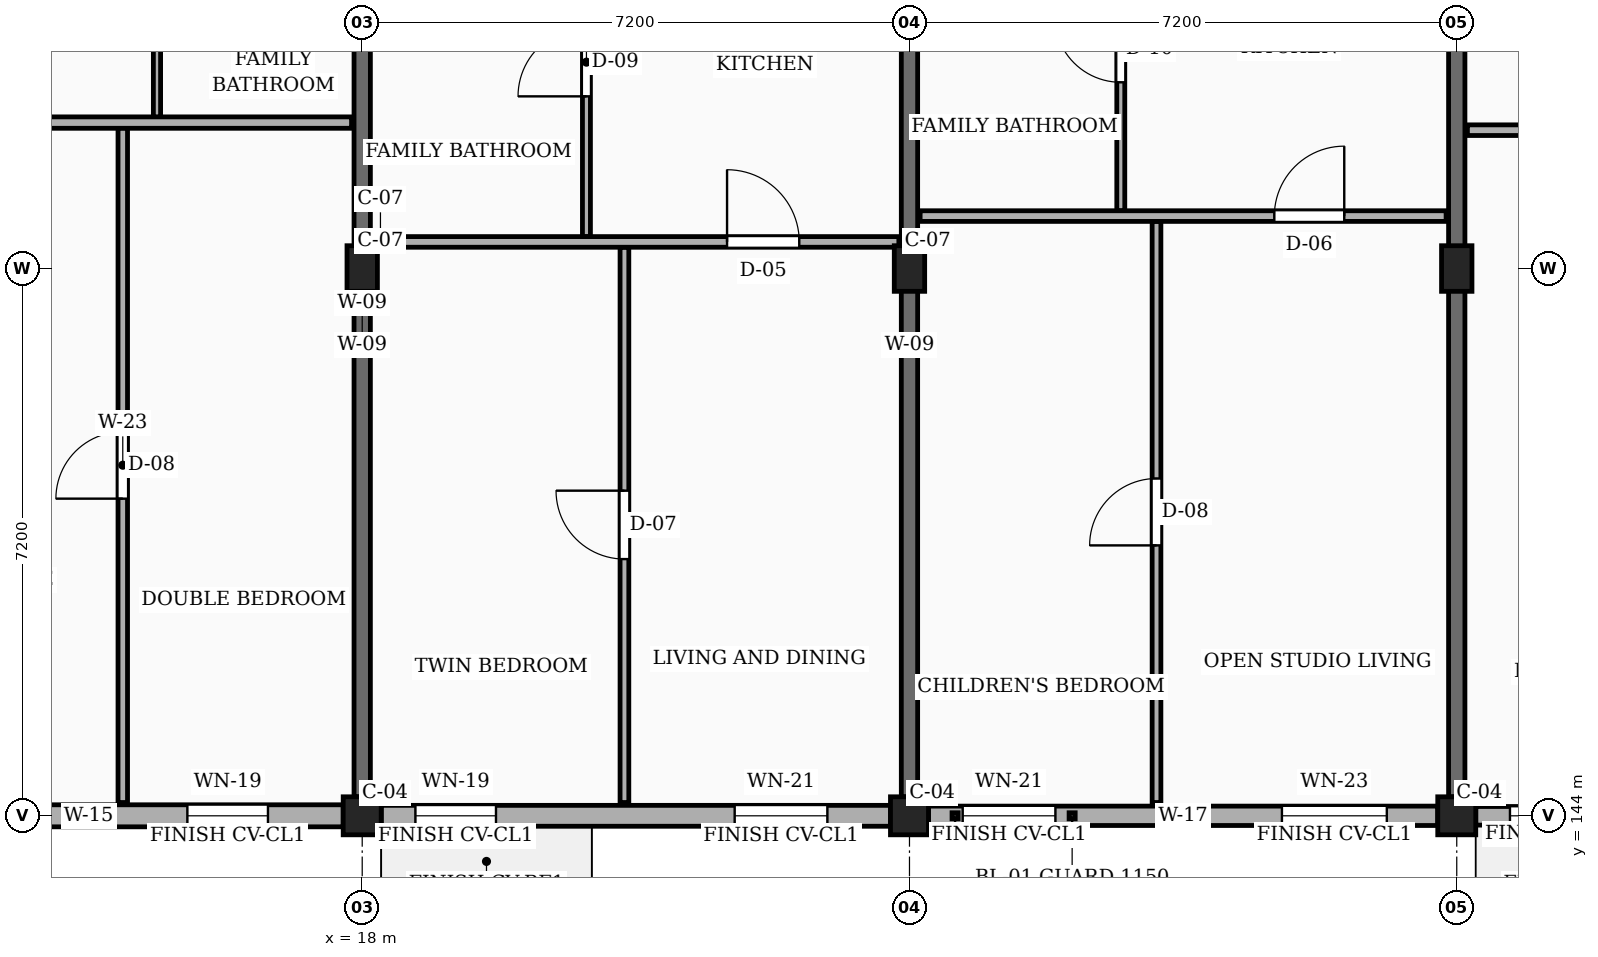
"""IFC4 building model, lengths in metres.
Left out: names, types, materials, properties, quantities, classifications, styles, units other than length and angle.
Written with IfcOpenShell. Run it as: python <this file> out.ifc"""

import sys

from ifc_helpers import new_model, si_unit, direction, frame, frame_2d, origin, origin_2d, place, context, subcontext, project, spatial, rectangle, extrude, element, fill, save


model = new_model("IFC4")
c1 = context("Model", 3, precision=1e-05, world=origin(), true_north=direction((0.0, 1.0)))
c2 = subcontext(c1, "Body", "Model", "MODEL_VIEW")
j1 = project(units=[si_unit("LENGTHUNIT", "METRE"), si_unit("PLANEANGLEUNIT", "RADIAN")], contexts=[c1])
p1 = place(None, origin())
s1 = spatial("IfcSite", under=j1, at=p1, CompositionType="ELEMENT")
p2 = place(p1, origin())
s2 = spatial("IfcBuilding", under=s1, at=p2, CompositionType="ELEMENT")
p3 = place(p2, frame((0.0, 0.0, 32.85)))
s3 = spatial("IfcBuildingStorey", under=s2, at=p3, CompositionType="ELEMENT", Elevation=32.85)
p4 = place(p3, frame((18.0, 144.0, 0.0), z_axis=(0.0, 0.0, 1.0), x_axis=(1.0, 0.0, 0.0)))
e1 = element("IfcColumn", 1, at=p4, inside=s3, PredefinedType="COLUMN", context=c2, shape_type="SweptSolid", body=[
    extrude(rectangle(XDim=0.5, YDim=0.5, at=origin_2d()), origin(), (0.0, 0.0, 1.0), 3.15),
])
p5 = place(p3, frame((18.0, 151.2, 0.0), z_axis=(0.0, 0.0, 1.0), x_axis=(1.0, 0.0, 0.0)))
e2 = element("IfcColumn", 2, at=p5, inside=s3, PredefinedType="COLUMN", context=c2, shape_type="SweptSolid", body=[
    extrude(rectangle(XDim=0.4, YDim=0.6, at=origin_2d()), origin(), (0.0, 0.0, 1.0), 3.15),
])
p6 = place(p3, frame((25.2, 144.0, 0.0), z_axis=(0.0, 0.0, 1.0), x_axis=(1.0, 0.0, 0.0)))
e3 = element("IfcColumn", 3, at=p6, inside=s3, PredefinedType="COLUMN", context=c2, shape_type="SweptSolid", body=[
    extrude(rectangle(XDim=0.5, YDim=0.5, at=origin_2d()), origin(), (0.0, 0.0, 1.0), 3.15),
])
p7 = place(p3, frame((25.2, 151.2, 0.0), z_axis=(0.0, 0.0, 1.0), x_axis=(1.0, 0.0, 0.0)))
e4 = element("IfcColumn", 4, at=p7, inside=s3, PredefinedType="COLUMN", context=c2, shape_type="SweptSolid", body=[
    extrude(rectangle(XDim=0.4, YDim=0.6, at=origin_2d()), origin(), (0.0, 0.0, 1.0), 3.15),
])
p8 = place(p3, frame((32.4, 144.0, 0.0), z_axis=(0.0, 0.0, 1.0), x_axis=(1.0, 0.0, 0.0)))
e5 = element("IfcColumn", 5, at=p8, inside=s3, PredefinedType="COLUMN", context=c2, shape_type="SweptSolid", body=[
    extrude(rectangle(XDim=0.5, YDim=0.5, at=origin_2d()), origin(), (0.0, 0.0, 1.0), 3.15),
])
p9 = place(p3, frame((32.4, 151.2, 0.0), z_axis=(0.0, 0.0, 1.0), x_axis=(1.0, 0.0, 0.0)))
e6 = element("IfcColumn", 6, at=p9, inside=s3, PredefinedType="COLUMN", context=c2, shape_type="SweptSolid", body=[
    extrude(rectangle(XDim=0.4, YDim=0.6, at=origin_2d()), origin(), (0.0, 0.0, 1.0), 3.15),
])
for number, where, z_axis, x_axis in (
    (7, (18.0, 144.25, 0.0), (0.0, 0.0, 1.0), (0.0, 1.0, 0.0)),
    (8, (25.2, 144.25, 0.0), (0.0, 0.0, 1.0), (0.0, 1.0, 0.0)),
    (9, (32.4, 144.25, 0.0), (0.0, 0.0, 1.0), (0.0, 1.0, 0.0)),
):
    element("IfcWall", number, at=place(p3, frame(where, z_axis=z_axis, x_axis=x_axis)), inside=s3, PredefinedType="SOLIDWALL", context=c2, shape_type="SweptSolid", body=[
        extrude(rectangle(XDim=11.9, YDim=0.215, at=frame_2d((5.95, 0.0))), origin(), (0.0, 0.0, 1.0), 2.185),
    ])
p10 = place(p3, frame((11.05, 144.0, 0.0), z_axis=(0.0, 0.0, 1.0), x_axis=(1.0, 0.0, 0.0)))
e10 = element("IfcWall", 10, at=p10, inside=s3, PredefinedType="SOLIDWALL", context=c2, shape_type="SweptSolid", body=[
    extrude(rectangle(XDim=6.7, YDim=0.29, at=frame_2d((3.35, 0.0))), origin(), (0.0, 0.0, 1.0), 2.455),
])
p11 = place(p10, frame((0.45, 0.0, 0.78)))
e11 = element("IfcOpeningElement", 11, at=p11, cuts=e10, PredefinedType="OPENING", context=c2, shape_type="SweptSolid", body=[
    extrude(rectangle(XDim=0.9, YDim=1.36, at=frame_2d((0.45, 0.68))), frame((0.0, 0.155, 0.0), z_axis=(0.0, -1.0, 0.0), x_axis=(1.0, 0.0, 0.0)), (0.0, 0.0, 1.0), 0.31),
])
p12 = place(p10, frame((4.65, 0.0, 0.78)))
e12 = element("IfcOpeningElement", 12, at=p12, cuts=e10, PredefinedType="OPENING", context=c2, shape_type="SweptSolid", body=[
    extrude(rectangle(XDim=1.06, YDim=1.36, at=frame_2d((0.53, 0.68))), frame((0.0, 0.155, 0.0), z_axis=(0.0, -1.0, 0.0), x_axis=(1.0, 0.0, 0.0)), (0.0, 0.0, 1.0), 0.31),
])
p13 = place(p3, frame((18.25, 144.0, 0.0), z_axis=(0.0, 0.0, 1.0), x_axis=(1.0, 0.0, 0.0)))
e13 = element("IfcWall", 13, at=p13, inside=s3, PredefinedType="SOLIDWALL", context=c2, shape_type="SweptSolid", body=[
    extrude(rectangle(XDim=6.7, YDim=0.275, at=frame_2d((3.35, 0.0))), origin(), (0.0, 0.0, 1.0), 2.455),
])
p14 = place(p13, frame((0.45, 0.0, 0.78)))
e14 = element("IfcOpeningElement", 14, at=p14, cuts=e13, PredefinedType="OPENING", context=c2, shape_type="SweptSolid", body=[
    extrude(rectangle(XDim=1.06, YDim=1.36, at=frame_2d((0.53, 0.68))), frame((0.0, 0.147, 0.0), z_axis=(0.0, -1.0, 0.0), x_axis=(1.0, 0.0, 0.0)), (0.0, 0.0, 1.0), 0.295),
])
p15 = place(p13, frame((4.65, 0.0, 0.78)))
e15 = element("IfcOpeningElement", 15, at=p15, cuts=e13, PredefinedType="OPENING", context=c2, shape_type="SweptSolid", body=[
    extrude(rectangle(XDim=1.22, YDim=1.36, at=frame_2d((0.61, 0.68))), frame((0.0, 0.147, 0.0), z_axis=(0.0, -1.0, 0.0), x_axis=(1.0, 0.0, 0.0)), (0.0, 0.0, 1.0), 0.295),
])
p16 = place(p3, frame((25.45, 144.0, 0.0), z_axis=(0.0, 0.0, 1.0), x_axis=(1.0, 0.0, 0.0)))
e16 = element("IfcWall", 16, at=p16, inside=s3, PredefinedType="SOLIDWALL", context=c2, shape_type="SweptSolid", body=[
    extrude(rectangle(XDim=6.7, YDim=0.255, at=frame_2d((3.35, 0.0))), origin(), (0.0, 0.0, 1.0), 2.455),
])
p17 = place(p16, frame((0.45, 0.0, 0.78)))
e17 = element("IfcOpeningElement", 17, at=p17, cuts=e16, PredefinedType="OPENING", context=c2, shape_type="SweptSolid", body=[
    extrude(rectangle(XDim=1.22, YDim=1.36, at=frame_2d((0.61, 0.68))), frame((0.0, 0.137, 0.0), z_axis=(0.0, -1.0, 0.0), x_axis=(1.0, 0.0, 0.0)), (0.0, 0.0, 1.0), 0.275),
])
p18 = place(p16, frame((4.65, 0.0, 0.78)))
e18 = element("IfcOpeningElement", 18, at=p18, cuts=e16, PredefinedType="OPENING", context=c2, shape_type="SweptSolid", body=[
    extrude(rectangle(XDim=1.38, YDim=1.36, at=frame_2d((0.69, 0.68))), frame((0.0, 0.137, 0.0), z_axis=(0.0, -1.0, 0.0), x_axis=(1.0, 0.0, 0.0)), (0.0, 0.0, 1.0), 0.275),
])
p19 = place(p3, frame((32.65, 144.0, 0.0), z_axis=(0.0, 0.0, 1.0), x_axis=(1.0, 0.0, 0.0)))
e19 = element("IfcWall", 19, at=p19, inside=s3, PredefinedType="SOLIDWALL", context=c2, shape_type="SweptSolid", body=[
    extrude(rectangle(XDim=6.7, YDim=0.245, at=frame_2d((3.35, 0.0))), origin(), (0.0, 0.0, 1.0), 2.455),
])
p20 = place(p19, frame((0.45, 0.0, 0.78)))
e20 = element("IfcOpeningElement", 20, at=p20, cuts=e19, PredefinedType="OPENING", context=c2, shape_type="SweptSolid", body=[
    extrude(rectangle(XDim=1.38, YDim=1.36, at=frame_2d((0.69, 0.68))), frame((0.0, 0.133, 0.0), z_axis=(0.0, -1.0, 0.0), x_axis=(1.0, 0.0, 0.0)), (0.0, 0.0, 1.0), 0.265),
])
p21 = place(p19, frame((4.65, 0.0, 0.78)))
e21 = element("IfcOpeningElement", 21, at=p21, cuts=e19, PredefinedType="OPENING", context=c2, shape_type="SweptSolid", body=[
    extrude(rectangle(XDim=0.94, YDim=1.44, at=frame_2d((0.47, 0.72))), frame((0.0, 0.133, 0.0), z_axis=(0.0, -1.0, 0.0), x_axis=(1.0, 0.0, 0.0)), (0.0, 0.0, 1.0), 0.265),
])
p22 = place(p3, frame((14.85, 144.175, 0.0), z_axis=(0.0, 0.0, 1.0), x_axis=(0.0, 1.0, 0.0)))
e22 = element("IfcWall", 22, at=p22, inside=s3, PredefinedType="PARTITIONING", context=c2, shape_type="SweptSolid", body=[
    extrude(rectangle(XDim=8.875, YDim=0.125, at=frame_2d((4.438, 0.0))), origin(), (0.0, 0.0, 1.0), 2.32),
])
p23 = place(p22, frame((3.998, 0.0, 0.0)))
e23 = element("IfcOpeningElement", 23, at=p23, cuts=e22, PredefinedType="OPENING", context=c2, shape_type="SweptSolid", body=[
    extrude(rectangle(XDim=0.88, YDim=2.08, at=frame_2d((0.44, 1.04))), frame((0.0, 0.073, 0.0), z_axis=(0.0, -1.0, 0.0), x_axis=(1.0, 0.0, 0.0)), (0.0, 0.0, 1.0), 0.145),
])
p24 = place(p3, frame((15.3, 153.19, 0.0), z_axis=(0.0, 0.0, 1.0), x_axis=(0.0, 1.0, 0.0)))
e24 = element("IfcWall", 24, at=p24, inside=s3, PredefinedType="PARTITIONING", context=c2, shape_type="SweptSolid", body=[
    extrude(rectangle(XDim=3.02, YDim=0.095, at=frame_2d((1.51, 0.0))), origin(), (0.0, 0.0, 1.0), 2.32),
])
p25 = place(p24, frame((1.075, 0.0, 0.0)))
e25 = element("IfcOpeningElement", 25, at=p25, cuts=e24, PredefinedType="OPENING", context=c2, shape_type="SweptSolid", body=[
    extrude(rectangle(XDim=0.87, YDim=2.05, at=frame_2d((0.435, 1.025))), frame((0.0, 0.058, 0.0), z_axis=(0.0, -1.0, 0.0), x_axis=(1.0, 0.0, 0.0)), (0.0, 0.0, 1.0), 0.115),
])
p26 = place(p3, frame((10.975, 153.12, 0.0), z_axis=(0.0, 0.0, 1.0), x_axis=(1.0, 0.0, 0.0)))
e26 = element("IfcWall", 26, at=p26, inside=s3, PredefinedType="PARTITIONING", context=c2, shape_type="SweptSolid", body=[
    extrude(rectangle(XDim=6.885, YDim=0.15, at=frame_2d((3.442, 0.0))), origin(), (0.0, 0.0, 1.0), 2.32),
])
p27 = place(p26, frame((1.275, 0.0, 0.0)))
e27 = element("IfcOpeningElement", 27, at=p27, cuts=e26, PredefinedType="OPENING", context=c2, shape_type="SweptSolid", body=[
    extrude(rectangle(XDim=0.92, YDim=2.1, at=frame_2d((0.46, 1.05))), frame((0.0, 0.085, 0.0), z_axis=(0.0, -1.0, 0.0), x_axis=(1.0, 0.0, 0.0)), (0.0, 0.0, 1.0), 0.17),
])
p28 = place(p3, frame((21.45, 144.175, 0.0), z_axis=(0.0, 0.0, 1.0), x_axis=(0.0, 1.0, 0.0)))
e28 = element("IfcWall", 28, at=p28, inside=s3, PredefinedType="PARTITIONING", context=c2, shape_type="SweptSolid", body=[
    extrude(rectangle(XDim=7.305, YDim=0.115, at=frame_2d((3.652, 0.0))), origin(), (0.0, 0.0, 1.0), 2.32),
])
p29 = place(p28, frame((3.202, 0.0, 0.0)))
e29 = element("IfcOpeningElement", 29, at=p29, cuts=e28, PredefinedType="OPENING", context=c2, shape_type="SweptSolid", body=[
    extrude(rectangle(XDim=0.9, YDim=2.1, at=frame_2d((0.45, 1.05))), frame((0.0, 0.067, 0.0), z_axis=(0.0, -1.0, 0.0), x_axis=(1.0, 0.0, 0.0)), (0.0, 0.0, 1.0), 0.135),
])
p30 = place(p3, frame((20.95, 151.62, 0.0), z_axis=(0.0, 0.0, 1.0), x_axis=(0.0, 1.0, 0.0)))
e30 = element("IfcWall", 30, at=p30, inside=s3, PredefinedType="PARTITIONING", context=c2, shape_type="SweptSolid", body=[
    extrude(rectangle(XDim=4.59, YDim=0.105, at=frame_2d((2.295, 0.0))), origin(), (0.0, 0.0, 1.0), 2.32),
])
p31 = place(p30, frame((1.845, 0.0, 0.0)))
e31 = element("IfcOpeningElement", 31, at=p31, cuts=e30, PredefinedType="OPENING", context=c2, shape_type="SweptSolid", body=[
    extrude(rectangle(XDim=0.9, YDim=2.05, at=frame_2d((0.45, 1.025))), frame((0.0, 0.062, 0.0), z_axis=(0.0, -1.0, 0.0), x_axis=(1.0, 0.0, 0.0)), (0.0, 0.0, 1.0), 0.125),
])
p32 = place(p3, frame((18.14, 151.55, 0.0), z_axis=(0.0, 0.0, 1.0), x_axis=(1.0, 0.0, 0.0)))
e32 = element("IfcWall", 32, at=p32, inside=s3, PredefinedType="PARTITIONING", context=c2, shape_type="SweptSolid", body=[
    extrude(rectangle(XDim=6.92, YDim=0.14, at=frame_2d((3.46, 0.0))), origin(), (0.0, 0.0, 1.0), 2.32),
])
p33 = place(p32, frame((4.66, 0.0, 0.0)))
e33 = element("IfcOpeningElement", 33, at=p33, cuts=e32, PredefinedType="OPENING", context=c2, shape_type="SweptSolid", body=[
    extrude(rectangle(XDim=0.95, YDim=2.1, at=frame_2d((0.475, 1.05))), frame((0.0, 0.08, 0.0), z_axis=(0.0, -1.0, 0.0), x_axis=(1.0, 0.0, 0.0)), (0.0, 0.0, 1.0), 0.16),
])
p34 = place(p3, frame((28.45, 144.175, 0.0), z_axis=(0.0, 0.0, 1.0), x_axis=(0.0, 1.0, 0.0)))
e34 = element("IfcWall", 34, at=p34, inside=s3, PredefinedType="PARTITIONING", context=c2, shape_type="SweptSolid", body=[
    extrude(rectangle(XDim=7.645, YDim=0.115, at=frame_2d((3.823, 0.0))), origin(), (0.0, 0.0, 1.0), 2.32),
])
p35 = place(p34, frame((3.383, 0.0, 0.0)))
e35 = element("IfcOpeningElement", 35, at=p35, cuts=e34, PredefinedType="OPENING", context=c2, shape_type="SweptSolid", body=[
    extrude(rectangle(XDim=0.88, YDim=2.08, at=frame_2d((0.44, 1.04))), frame((0.0, 0.067, 0.0), z_axis=(0.0, -1.0, 0.0), x_axis=(1.0, 0.0, 0.0)), (0.0, 0.0, 1.0), 0.135),
])
p36 = place(p3, frame((27.98, 151.96, 0.0), z_axis=(0.0, 0.0, 1.0), x_axis=(0.0, 1.0, 0.0)))
e36 = element("IfcWall", 36, at=p36, inside=s3, PredefinedType="PARTITIONING", context=c2, shape_type="SweptSolid", body=[
    extrude(rectangle(XDim=4.25, YDim=0.105, at=frame_2d((2.125, 0.0))), origin(), (0.0, 0.0, 1.0), 2.32),
])
p37 = place(p36, frame((1.69, 0.0, 0.0)))
e37 = element("IfcOpeningElement", 37, at=p37, cuts=e36, PredefinedType="OPENING", context=c2, shape_type="SweptSolid", body=[
    extrude(rectangle(XDim=0.87, YDim=2.05, at=frame_2d((0.435, 1.025))), frame((0.0, 0.062, 0.0), z_axis=(0.0, -1.0, 0.0), x_axis=(1.0, 0.0, 0.0)), (0.0, 0.0, 1.0), 0.125),
])
p38 = place(p3, frame((25.34, 151.89, 0.0), z_axis=(0.0, 0.0, 1.0), x_axis=(1.0, 0.0, 0.0)))
e38 = element("IfcWall", 38, at=p38, inside=s3, PredefinedType="PARTITIONING", context=c2, shape_type="SweptSolid", body=[
    extrude(rectangle(XDim=6.92, YDim=0.14, at=frame_2d((3.46, 0.0))), origin(), (0.0, 0.0, 1.0), 2.32),
])
p39 = place(p38, frame((4.66, 0.0, 0.0)))
e39 = element("IfcOpeningElement", 39, at=p39, cuts=e38, PredefinedType="OPENING", context=c2, shape_type="SweptSolid", body=[
    extrude(rectangle(XDim=0.92, YDim=2.1, at=frame_2d((0.46, 1.05))), frame((0.0, 0.08, 0.0), z_axis=(0.0, -1.0, 0.0), x_axis=(1.0, 0.0, 0.0)), (0.0, 0.0, 1.0), 0.16),
])
p40 = place(p3, frame((32.54, 153.02, 0.0), z_axis=(0.0, 0.0, 1.0), x_axis=(1.0, 0.0, 0.0)))
e40 = element("IfcWall", 40, at=p40, inside=s3, PredefinedType="PARTITIONING", context=c2, shape_type="SweptSolid", body=[
    extrude(rectangle(XDim=6.92, YDim=0.14, at=frame_2d((3.46, 0.0))), origin(), (0.0, 0.0, 1.0), 2.32),
])
p41 = place(p40, frame((1.31, 0.0, 0.0)))
e41 = element("IfcOpeningElement", 41, at=p41, cuts=e40, PredefinedType="OPENING", context=c2, shape_type="SweptSolid", body=[
    extrude(rectangle(XDim=0.95, YDim=2.1, at=frame_2d((0.475, 1.05))), frame((0.0, 0.08, 0.0), z_axis=(0.0, -1.0, 0.0), x_axis=(1.0, 0.0, 0.0)), (0.0, 0.0, 1.0), 0.16),
])
p42 = place(p12, origin())
e42 = element("IfcWindow", 42, at=p42, inside=s3, PartitioningType="SINGLE_PANEL", PredefinedType="WINDOW", context=c2, shape_type="SweptSolid", body=[
    extrude(rectangle(XDim=1.06, YDim=1.36, at=frame_2d((0.53, 0.68))), frame((0.0, 0.03, 0.0), z_axis=(0.0, -1.0, 0.0), x_axis=(1.0, 0.0, 0.0)), (0.0, 0.0, 1.0), 0.06),
])
fill(e12, e42)
p43 = place(p14, origin())
e43 = element("IfcWindow", 43, at=p43, inside=s3, PartitioningType="SINGLE_PANEL", PredefinedType="WINDOW", context=c2, shape_type="SweptSolid", body=[
    extrude(rectangle(XDim=1.06, YDim=1.36, at=frame_2d((0.53, 0.68))), frame((0.0, 0.03, 0.0), z_axis=(0.0, -1.0, 0.0), x_axis=(1.0, 0.0, 0.0)), (0.0, 0.0, 1.0), 0.06),
])
fill(e14, e43)
p44 = place(p15, origin())
e44 = element("IfcWindow", 44, at=p44, inside=s3, PartitioningType="SINGLE_PANEL", PredefinedType="WINDOW", context=c2, shape_type="SweptSolid", body=[
    extrude(rectangle(XDim=1.22, YDim=1.36, at=frame_2d((0.61, 0.68))), frame((0.0, 0.03, 0.0), z_axis=(0.0, -1.0, 0.0), x_axis=(1.0, 0.0, 0.0)), (0.0, 0.0, 1.0), 0.06),
])
fill(e15, e44)
p45 = place(p17, origin())
e45 = element("IfcWindow", 45, at=p45, inside=s3, PartitioningType="SINGLE_PANEL", PredefinedType="WINDOW", context=c2, shape_type="SweptSolid", body=[
    extrude(rectangle(XDim=1.22, YDim=1.36, at=frame_2d((0.61, 0.68))), frame((0.0, 0.03, 0.0), z_axis=(0.0, -1.0, 0.0), x_axis=(1.0, 0.0, 0.0)), (0.0, 0.0, 1.0), 0.06),
])
fill(e17, e45)
p46 = place(p18, origin())
e46 = element("IfcWindow", 46, at=p46, inside=s3, PartitioningType="SINGLE_PANEL", PredefinedType="WINDOW", context=c2, shape_type="SweptSolid", body=[
    extrude(rectangle(XDim=1.38, YDim=1.36, at=frame_2d((0.69, 0.68))), frame((0.0, 0.03, 0.0), z_axis=(0.0, -1.0, 0.0), x_axis=(1.0, 0.0, 0.0)), (0.0, 0.0, 1.0), 0.06),
])
fill(e18, e46)
p47 = place(p20, origin())
e47 = element("IfcWindow", 47, at=p47, inside=s3, PartitioningType="SINGLE_PANEL", PredefinedType="WINDOW", context=c2, shape_type="SweptSolid", body=[
    extrude(rectangle(XDim=1.38, YDim=1.36, at=frame_2d((0.69, 0.68))), frame((0.0, 0.03, 0.0), z_axis=(0.0, -1.0, 0.0), x_axis=(1.0, 0.0, 0.0)), (0.0, 0.0, 1.0), 0.06),
])
fill(e20, e47)
p48 = place(p23, origin())
e48 = element("IfcDoor", 48, at=p48, inside=s3, OperationType="SINGLE_SWING_LEFT", PredefinedType="DOOR", context=c2, shape_type="SweptSolid", body=[
    extrude(rectangle(XDim=0.88, YDim=2.08, at=frame_2d((0.44, 1.04))), frame((0.0, 0.025, 0.0), z_axis=(0.0, -1.0, 0.0), x_axis=(1.0, 0.0, 0.0)), (0.0, 0.0, 1.0), 0.05),
])
fill(e23, e48)
p49 = place(p29, origin())
e49 = element("IfcDoor", 49, at=p49, inside=s3, OperationType="SINGLE_SWING_RIGHT", PredefinedType="DOOR", context=c2, shape_type="SweptSolid", body=[
    extrude(rectangle(XDim=0.9, YDim=2.1, at=frame_2d((0.45, 1.05))), frame((0.0, 0.025, 0.0), z_axis=(0.0, -1.0, 0.0), x_axis=(1.0, 0.0, 0.0)), (0.0, 0.0, 1.0), 0.05),
])
fill(e29, e49)
p50 = place(p31, origin())
e50 = element("IfcDoor", 50, at=p50, inside=s3, OperationType="SINGLE_SWING_LEFT", PredefinedType="DOOR", context=c2, shape_type="SweptSolid", body=[
    extrude(rectangle(XDim=0.9, YDim=2.05, at=frame_2d((0.45, 1.025))), frame((0.0, 0.025, 0.0), z_axis=(0.0, -1.0, 0.0), x_axis=(1.0, 0.0, 0.0)), (0.0, 0.0, 1.0), 0.05),
])
fill(e31, e50)
p51 = place(p33, origin())
e51 = element("IfcDoor", 51, at=p51, inside=s3, OperationType="SINGLE_SWING_LEFT", PredefinedType="DOOR", context=c2, shape_type="SweptSolid", body=[
    extrude(rectangle(XDim=0.95, YDim=2.1, at=frame_2d((0.475, 1.05))), frame((0.0, 0.025, 0.0), z_axis=(0.0, -1.0, 0.0), x_axis=(1.0, 0.0, 0.0)), (0.0, 0.0, 1.0), 0.05),
])
fill(e33, e51)
p52 = place(p35, origin())
e52 = element("IfcDoor", 52, at=p52, inside=s3, OperationType="SINGLE_SWING_LEFT", PredefinedType="DOOR", context=c2, shape_type="SweptSolid", body=[
    extrude(rectangle(XDim=0.88, YDim=2.08, at=frame_2d((0.44, 1.04))), frame((0.0, 0.025, 0.0), z_axis=(0.0, -1.0, 0.0), x_axis=(1.0, 0.0, 0.0)), (0.0, 0.0, 1.0), 0.05),
])
fill(e35, e52)
p53 = place(p37, origin())
e53 = element("IfcDoor", 53, at=p53, inside=s3, OperationType="SINGLE_SWING_RIGHT", PredefinedType="DOOR", context=c2, shape_type="SweptSolid", body=[
    extrude(rectangle(XDim=0.87, YDim=2.05, at=frame_2d((0.435, 1.025))), frame((0.0, 0.025, 0.0), z_axis=(0.0, -1.0, 0.0), x_axis=(1.0, 0.0, 0.0)), (0.0, 0.0, 1.0), 0.05),
])
fill(e37, e53)
p54 = place(p39, origin())
e54 = element("IfcDoor", 54, at=p54, inside=s3, OperationType="SINGLE_SWING_RIGHT", PredefinedType="DOOR", context=c2, shape_type="SweptSolid", body=[
    extrude(rectangle(XDim=0.92, YDim=2.1, at=frame_2d((0.46, 1.05))), frame((0.0, 0.025, 0.0), z_axis=(0.0, -1.0, 0.0), x_axis=(1.0, 0.0, 0.0)), (0.0, 0.0, 1.0), 0.05),
])
fill(e39, e54)
save(model, sys.argv[1])
